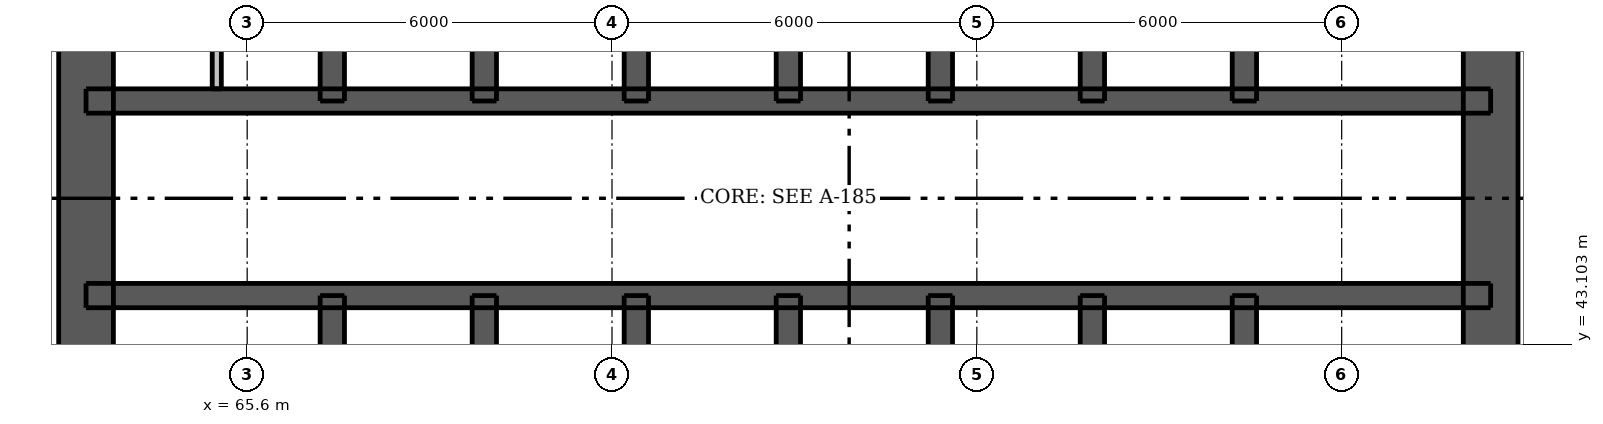
"""IFC4 building model, lengths in metres.
Left out: names, types, materials, properties, quantities, classifications, styles, units other than length and angle.
Written with IfcOpenShell. Run it as: python <this file> out.ifc"""

import sys

from ifc_helpers import new_model, si_unit, direction, frame, frame_2d, origin, place, context, subcontext, project, spatial, rectangle, extrude, element, fill, save


model = new_model("IFC4")
c1 = context("Model", 3, precision=1e-05, world=origin(), true_north=direction((0.0, 1.0)))
c2 = subcontext(c1, "Body", "Model", "MODEL_VIEW")
j1 = project(units=[si_unit("LENGTHUNIT", "METRE"), si_unit("PLANEANGLEUNIT", "RADIAN")], contexts=[c1])
p1 = place(None, origin())
s1 = spatial("IfcSite", under=j1, at=p1, CompositionType="ELEMENT")
p2 = place(p1, origin())
s2 = spatial("IfcBuilding", under=s1, at=p2, CompositionType="ELEMENT")
p3 = place(p2, frame((0.0, 0.0, 30.1)))
s3 = spatial("IfcBuildingStorey", under=s2, at=p3, CompositionType="ELEMENT", Elevation=30.1)
p4 = place(p3, frame((62.95, 33.5, 0.0), z_axis=(0.0, 0.0, 1.0), x_axis=(0.0, 1.0, 0.0)))
e1 = element("IfcWall", 1, at=p4, inside=s3, PredefinedType="SHEAR", context=c2, shape_type="SweptSolid", body=[
    extrude(rectangle(XDim=24.0, YDim=0.9, at=frame_2d((12.0, 0.0))), origin(), (0.0, 0.0, 1.0), 3.05),
])
p5 = place(p4, frame((11.2, 0.0, 0.0)))
e2 = element("IfcOpeningElement", 2, at=p5, cuts=e1, PredefinedType="OPENING", context=c2, shape_type="SweptSolid", body=[
    extrude(rectangle(XDim=1.6, YDim=2.1, at=frame_2d((0.8, 1.05))), frame((0.0, 0.46, 0.0), z_axis=(0.0, -1.0, 0.0), x_axis=(1.0, 0.0, 0.0)), (0.0, 0.0, 1.0), 0.92),
])
p6 = place(p3, frame((86.05, 33.5, 0.0), z_axis=(0.0, 0.0, 1.0), x_axis=(0.0, 1.0, 0.0)))
e3 = element("IfcWall", 3, at=p6, inside=s3, PredefinedType="SHEAR", context=c2, shape_type="SweptSolid", body=[
    extrude(rectangle(XDim=24.0, YDim=0.9, at=frame_2d((12.0, 0.0))), origin(), (0.0, 0.0, 1.0), 3.05),
])
p7 = place(p6, frame((11.2, 0.0, 0.0)))
e4 = element("IfcOpeningElement", 4, at=p7, cuts=e3, PredefinedType="OPENING", context=c2, shape_type="SweptSolid", body=[
    extrude(rectangle(XDim=1.6, YDim=2.1, at=frame_2d((0.8, 1.05))), frame((0.0, 0.46, 0.0), z_axis=(0.0, -1.0, 0.0), x_axis=(1.0, 0.0, 0.0)), (0.0, 0.0, 1.0), 0.92),
])
p8 = place(p3, frame((62.95, 43.9, 0.0), z_axis=(0.0, 0.0, 1.0), x_axis=(1.0, 0.0, 0.0)))
e5 = element("IfcWall", 5, at=p8, inside=s3, PredefinedType="SHEAR", context=c2, shape_type="SweptSolid", body=[
    extrude(rectangle(XDim=23.1, YDim=0.4, at=frame_2d((11.55, 0.0))), origin(), (0.0, 0.0, 1.0), 3.05),
])
p9 = place(p8, frame((1.7, 0.0, 0.0)))
e6 = element("IfcOpeningElement", 6, at=p9, cuts=e5, PredefinedType="OPENING", context=c2, shape_type="SweptSolid", body=[
    extrude(rectangle(XDim=0.9, YDim=2.1, at=frame_2d((0.45, 1.05))), frame((0.0, 0.21, 0.0), z_axis=(0.0, -1.0, 0.0), x_axis=(1.0, 0.0, 0.0)), (0.0, 0.0, 1.0), 0.42),
])
p10 = place(p8, frame((20.5, 0.0, 0.0)))
e7 = element("IfcOpeningElement", 7, at=p10, cuts=e5, PredefinedType="OPENING", context=c2, shape_type="SweptSolid", body=[
    extrude(rectangle(XDim=0.9, YDim=2.1, at=frame_2d((0.45, 1.05))), frame((0.0, 0.21, 0.0), z_axis=(0.0, -1.0, 0.0), x_axis=(1.0, 0.0, 0.0)), (0.0, 0.0, 1.0), 0.42),
])
p11 = place(p8, frame((4.75, 0.0, 0.0)))
e8 = element("IfcOpeningElement", 8, at=p11, cuts=e5, PredefinedType="OPENING", context=c2, shape_type="SweptSolid", body=[
    extrude(rectangle(XDim=1.1, YDim=2.1, at=frame_2d((0.55, 1.05))), frame((0.0, 0.21, 0.0), z_axis=(0.0, -1.0, 0.0), x_axis=(1.0, 0.0, 0.0)), (0.0, 0.0, 1.0), 0.42),
])
p12 = place(p8, frame((7.25, 0.0, 0.0)))
e9 = element("IfcOpeningElement", 9, at=p12, cuts=e5, PredefinedType="OPENING", context=c2, shape_type="SweptSolid", body=[
    extrude(rectangle(XDim=1.1, YDim=2.1, at=frame_2d((0.55, 1.05))), frame((0.0, 0.21, 0.0), z_axis=(0.0, -1.0, 0.0), x_axis=(1.0, 0.0, 0.0)), (0.0, 0.0, 1.0), 0.42),
])
p13 = place(p8, frame((9.75, 0.0, 0.0)))
e10 = element("IfcOpeningElement", 10, at=p13, cuts=e5, PredefinedType="OPENING", context=c2, shape_type="SweptSolid", body=[
    extrude(rectangle(XDim=1.1, YDim=2.1, at=frame_2d((0.55, 1.05))), frame((0.0, 0.21, 0.0), z_axis=(0.0, -1.0, 0.0), x_axis=(1.0, 0.0, 0.0)), (0.0, 0.0, 1.0), 0.42),
])
p14 = place(p8, frame((12.25, 0.0, 0.0)))
e11 = element("IfcOpeningElement", 11, at=p14, cuts=e5, PredefinedType="OPENING", context=c2, shape_type="SweptSolid", body=[
    extrude(rectangle(XDim=1.1, YDim=2.1, at=frame_2d((0.55, 1.05))), frame((0.0, 0.21, 0.0), z_axis=(0.0, -1.0, 0.0), x_axis=(1.0, 0.0, 0.0)), (0.0, 0.0, 1.0), 0.42),
])
p15 = place(p8, frame((14.75, 0.0, 0.0)))
e12 = element("IfcOpeningElement", 12, at=p15, cuts=e5, PredefinedType="OPENING", context=c2, shape_type="SweptSolid", body=[
    extrude(rectangle(XDim=1.1, YDim=2.1, at=frame_2d((0.55, 1.05))), frame((0.0, 0.21, 0.0), z_axis=(0.0, -1.0, 0.0), x_axis=(1.0, 0.0, 0.0)), (0.0, 0.0, 1.0), 0.42),
])
p16 = place(p8, frame((17.25, 0.0, 0.0)))
e13 = element("IfcOpeningElement", 13, at=p16, cuts=e5, PredefinedType="OPENING", context=c2, shape_type="SweptSolid", body=[
    extrude(rectangle(XDim=1.1, YDim=2.1, at=frame_2d((0.55, 1.05))), frame((0.0, 0.21, 0.0), z_axis=(0.0, -1.0, 0.0), x_axis=(1.0, 0.0, 0.0)), (0.0, 0.0, 1.0), 0.42),
])
p17 = place(p3, frame((62.95, 47.1, 0.0), z_axis=(0.0, 0.0, 1.0), x_axis=(1.0, 0.0, 0.0)))
e14 = element("IfcWall", 14, at=p17, inside=s3, PredefinedType="SHEAR", context=c2, shape_type="SweptSolid", body=[
    extrude(rectangle(XDim=23.1, YDim=0.4, at=frame_2d((11.55, 0.0))), origin(), (0.0, 0.0, 1.0), 3.05),
])
p18 = place(p17, frame((0.85, 0.0, 0.0)))
e15 = element("IfcOpeningElement", 15, at=p18, cuts=e14, PredefinedType="OPENING", context=c2, shape_type="SweptSolid", body=[
    extrude(rectangle(XDim=0.9, YDim=2.1, at=frame_2d((0.45, 1.05))), frame((0.0, 0.21, 0.0), z_axis=(0.0, -1.0, 0.0), x_axis=(1.0, 0.0, 0.0)), (0.0, 0.0, 1.0), 0.42),
])
p19 = place(p17, frame((2.55, 0.0, 0.0)))
e16 = element("IfcOpeningElement", 16, at=p19, cuts=e14, PredefinedType="OPENING", context=c2, shape_type="SweptSolid", body=[
    extrude(rectangle(XDim=0.9, YDim=2.1, at=frame_2d((0.45, 1.05))), frame((0.0, 0.21, 0.0), z_axis=(0.0, -1.0, 0.0), x_axis=(1.0, 0.0, 0.0)), (0.0, 0.0, 1.0), 0.42),
])
p20 = place(p17, frame((20.5, 0.0, 0.0)))
e17 = element("IfcOpeningElement", 17, at=p20, cuts=e14, PredefinedType="OPENING", context=c2, shape_type="SweptSolid", body=[
    extrude(rectangle(XDim=0.9, YDim=2.1, at=frame_2d((0.45, 1.05))), frame((0.0, 0.21, 0.0), z_axis=(0.0, -1.0, 0.0), x_axis=(1.0, 0.0, 0.0)), (0.0, 0.0, 1.0), 0.42),
])
p21 = place(p3, frame((67.0, 33.95, 0.0), z_axis=(0.0, 0.0, 1.0), x_axis=(0.0, 1.0, 0.0)))
e18 = element("IfcWall", 18, at=p21, inside=s3, PredefinedType="SHEAR", context=c2, shape_type="SweptSolid", body=[
    extrude(rectangle(XDim=9.95, YDim=0.4, at=frame_2d((4.975, 0.0))), origin(), (0.0, 0.0, 1.0), 3.05),
])
p22 = place(p21, frame((0.65, 0.0, 0.0)))
e19 = element("IfcOpeningElement", 19, at=p22, cuts=e18, PredefinedType="OPENING", context=c2, shape_type="SweptSolid", body=[
    extrude(rectangle(XDim=1.1, YDim=2.1, at=frame_2d((0.55, 1.05))), frame((0.0, 0.21, 0.0), z_axis=(0.0, -1.0, 0.0), x_axis=(1.0, 0.0, 0.0)), (0.0, 0.0, 1.0), 0.42),
])
for number, where, z_axis, x_axis in (
    (20, (67.0, 47.1, 0.0), (0.0, 0.0, 1.0), (0.0, 1.0, 0.0)),
    (21, (82.0, 33.95, 0.0), (0.0, 0.0, 1.0), (0.0, 1.0, 0.0)),
    (22, (82.0, 47.1, 0.0), (0.0, 0.0, 1.0), (0.0, 1.0, 0.0)),
):
    element("IfcWall", number, at=place(p3, frame(where, z_axis=z_axis, x_axis=x_axis)), inside=s3, PredefinedType="SHEAR", context=c2, shape_type="SweptSolid", body=[
        extrude(rectangle(XDim=9.95, YDim=0.4, at=frame_2d((4.975, 0.0))), origin(), (0.0, 0.0, 1.0), 3.05),
    ])
for number, where, z_axis, x_axis in (
    (23, (69.5, 41.0, 0.0), (0.0, 0.0, 1.0), (0.0, 1.0, 0.0)),
    (24, (69.5, 47.1, 0.0), (0.0, 0.0, 1.0), (0.0, 1.0, 0.0)),
    (25, (72.0, 41.0, 0.0), (0.0, 0.0, 1.0), (0.0, 1.0, 0.0)),
    (26, (72.0, 47.1, 0.0), (0.0, 0.0, 1.0), (0.0, 1.0, 0.0)),
    (27, (74.5, 41.0, 0.0), (0.0, 0.0, 1.0), (0.0, 1.0, 0.0)),
    (28, (74.5, 47.1, 0.0), (0.0, 0.0, 1.0), (0.0, 1.0, 0.0)),
    (29, (77.0, 41.0, 0.0), (0.0, 0.0, 1.0), (0.0, 1.0, 0.0)),
    (30, (77.0, 47.1, 0.0), (0.0, 0.0, 1.0), (0.0, 1.0, 0.0)),
    (31, (79.5, 41.0, 0.0), (0.0, 0.0, 1.0), (0.0, 1.0, 0.0)),
    (32, (79.5, 47.1, 0.0), (0.0, 0.0, 1.0), (0.0, 1.0, 0.0)),
):
    element("IfcWall", number, at=place(p3, frame(where, z_axis=z_axis, x_axis=x_axis)), inside=s3, PredefinedType="SHEAR", context=c2, shape_type="SweptSolid", body=[
        extrude(rectangle(XDim=2.9, YDim=0.4, at=frame_2d((1.45, 0.0))), origin(), (0.0, 0.0, 1.0), 3.05),
    ])
p23 = place(p3, frame((65.1, 47.3, 0.0), z_axis=(0.0, 0.0, 1.0), x_axis=(0.0, 1.0, 0.0)))
e33 = element("IfcWall", 33, at=p23, inside=s3, PredefinedType="PLUMBINGWALL", context=c2, shape_type="SweptSolid", body=[
    extrude(rectangle(XDim=2.5, YDim=0.15, at=frame_2d((1.25, 0.0))), origin(), (0.0, 0.0, 1.0), 3.05),
])
p24 = place(p5, origin())
e34 = element("IfcDoor", 34, at=p24, inside=s3, OperationType="DOUBLE_DOOR_SINGLE_SWING", PredefinedType="DOOR", context=c2, shape_type="SweptSolid", body=[
    extrude(rectangle(XDim=1.6, YDim=2.1, at=frame_2d((0.8, 1.05))), frame((0.0, -0.388, 0.0), z_axis=(0.0, -1.0, 0.0), x_axis=(1.0, 0.0, 0.0)), (0.0, 0.0, 1.0), 0.05),
])
fill(e2, e34)
p25 = place(p7, origin())
e35 = element("IfcDoor", 35, at=p25, inside=s3, OperationType="DOUBLE_DOOR_SINGLE_SWING", PredefinedType="DOOR", context=c2, shape_type="SweptSolid", body=[
    extrude(rectangle(XDim=1.6, YDim=2.1, at=frame_2d((0.8, 1.05))), frame((0.0, 0.438, 0.0), z_axis=(0.0, -1.0, 0.0), x_axis=(1.0, 0.0, 0.0)), (0.0, 0.0, 1.0), 0.05),
])
fill(e4, e35)
p26 = place(p9, origin())
e36 = element("IfcDoor", 36, at=p26, inside=s3, OperationType="SINGLE_SWING_LEFT", PredefinedType="DOOR", context=c2, shape_type="SweptSolid", body=[
    extrude(rectangle(XDim=0.9, YDim=2.1, at=frame_2d((0.45, 1.05))), frame((0.0, -0.138, 0.0), z_axis=(0.0, -1.0, 0.0), x_axis=(1.0, 0.0, 0.0)), (0.0, 0.0, 1.0), 0.05),
])
fill(e6, e36)
p27 = place(p10, origin())
e37 = element("IfcDoor", 37, at=p27, inside=s3, OperationType="SINGLE_SWING_LEFT", PredefinedType="DOOR", context=c2, shape_type="SweptSolid", body=[
    extrude(rectangle(XDim=0.9, YDim=2.1, at=frame_2d((0.45, 1.05))), frame((0.0, -0.138, 0.0), z_axis=(0.0, -1.0, 0.0), x_axis=(1.0, 0.0, 0.0)), (0.0, 0.0, 1.0), 0.05),
])
fill(e7, e37)
p28 = place(p18, origin())
e38 = element("IfcDoor", 38, at=p28, inside=s3, OperationType="SINGLE_SWING_LEFT", PredefinedType="DOOR", context=c2, shape_type="SweptSolid", body=[
    extrude(rectangle(XDim=0.9, YDim=2.1, at=frame_2d((0.45, 1.05))), frame((0.0, 0.188, 0.0), z_axis=(0.0, -1.0, 0.0), x_axis=(1.0, 0.0, 0.0)), (0.0, 0.0, 1.0), 0.05),
])
fill(e15, e38)
p29 = place(p19, origin())
e39 = element("IfcDoor", 39, at=p29, inside=s3, OperationType="SINGLE_SWING_RIGHT", PredefinedType="DOOR", context=c2, shape_type="SweptSolid", body=[
    extrude(rectangle(XDim=0.9, YDim=2.1, at=frame_2d((0.45, 1.05))), frame((0.0, 0.188, 0.0), z_axis=(0.0, -1.0, 0.0), x_axis=(1.0, 0.0, 0.0)), (0.0, 0.0, 1.0), 0.05),
])
fill(e16, e39)
p30 = place(p20, origin())
e40 = element("IfcDoor", 40, at=p30, inside=s3, OperationType="SINGLE_SWING_LEFT", PredefinedType="DOOR", context=c2, shape_type="SweptSolid", body=[
    extrude(rectangle(XDim=0.9, YDim=2.1, at=frame_2d((0.45, 1.05))), frame((0.0, 0.188, 0.0), z_axis=(0.0, -1.0, 0.0), x_axis=(1.0, 0.0, 0.0)), (0.0, 0.0, 1.0), 0.05),
])
fill(e17, e40)
p31 = place(p11, origin())
e41 = element("IfcDoor", 41, at=p31, inside=s3, OperationType="DOUBLE_DOOR_SLIDING", PredefinedType="DOOR", context=c2, shape_type="SweptSolid", body=[
    extrude(rectangle(XDim=1.1, YDim=2.1, at=frame_2d((0.55, 1.05))), frame((0.0, 0.025, 0.0), z_axis=(0.0, -1.0, 0.0), x_axis=(1.0, 0.0, 0.0)), (0.0, 0.0, 1.0), 0.05),
])
fill(e8, e41)
p32 = place(p12, origin())
e42 = element("IfcDoor", 42, at=p32, inside=s3, OperationType="DOUBLE_DOOR_SLIDING", PredefinedType="DOOR", context=c2, shape_type="SweptSolid", body=[
    extrude(rectangle(XDim=1.1, YDim=2.1, at=frame_2d((0.55, 1.05))), frame((0.0, 0.025, 0.0), z_axis=(0.0, -1.0, 0.0), x_axis=(1.0, 0.0, 0.0)), (0.0, 0.0, 1.0), 0.05),
])
fill(e9, e42)
p33 = place(p13, origin())
e43 = element("IfcDoor", 43, at=p33, inside=s3, OperationType="DOUBLE_DOOR_SLIDING", PredefinedType="DOOR", context=c2, shape_type="SweptSolid", body=[
    extrude(rectangle(XDim=1.1, YDim=2.1, at=frame_2d((0.55, 1.05))), frame((0.0, 0.025, 0.0), z_axis=(0.0, -1.0, 0.0), x_axis=(1.0, 0.0, 0.0)), (0.0, 0.0, 1.0), 0.05),
])
fill(e10, e43)
p34 = place(p14, origin())
e44 = element("IfcDoor", 44, at=p34, inside=s3, OperationType="DOUBLE_DOOR_SLIDING", PredefinedType="DOOR", context=c2, shape_type="SweptSolid", body=[
    extrude(rectangle(XDim=1.1, YDim=2.1, at=frame_2d((0.55, 1.05))), frame((0.0, 0.025, 0.0), z_axis=(0.0, -1.0, 0.0), x_axis=(1.0, 0.0, 0.0)), (0.0, 0.0, 1.0), 0.05),
])
fill(e11, e44)
p35 = place(p15, origin())
e45 = element("IfcDoor", 45, at=p35, inside=s3, OperationType="DOUBLE_DOOR_SLIDING", PredefinedType="DOOR", context=c2, shape_type="SweptSolid", body=[
    extrude(rectangle(XDim=1.1, YDim=2.1, at=frame_2d((0.55, 1.05))), frame((0.0, 0.025, 0.0), z_axis=(0.0, -1.0, 0.0), x_axis=(1.0, 0.0, 0.0)), (0.0, 0.0, 1.0), 0.05),
])
fill(e12, e45)
p36 = place(p16, origin())
e46 = element("IfcDoor", 46, at=p36, inside=s3, OperationType="DOUBLE_DOOR_SLIDING", PredefinedType="DOOR", context=c2, shape_type="SweptSolid", body=[
    extrude(rectangle(XDim=1.1, YDim=2.1, at=frame_2d((0.55, 1.05))), frame((0.0, 0.025, 0.0), z_axis=(0.0, -1.0, 0.0), x_axis=(1.0, 0.0, 0.0)), (0.0, 0.0, 1.0), 0.05),
])
fill(e13, e46)
save(model, sys.argv[1])
